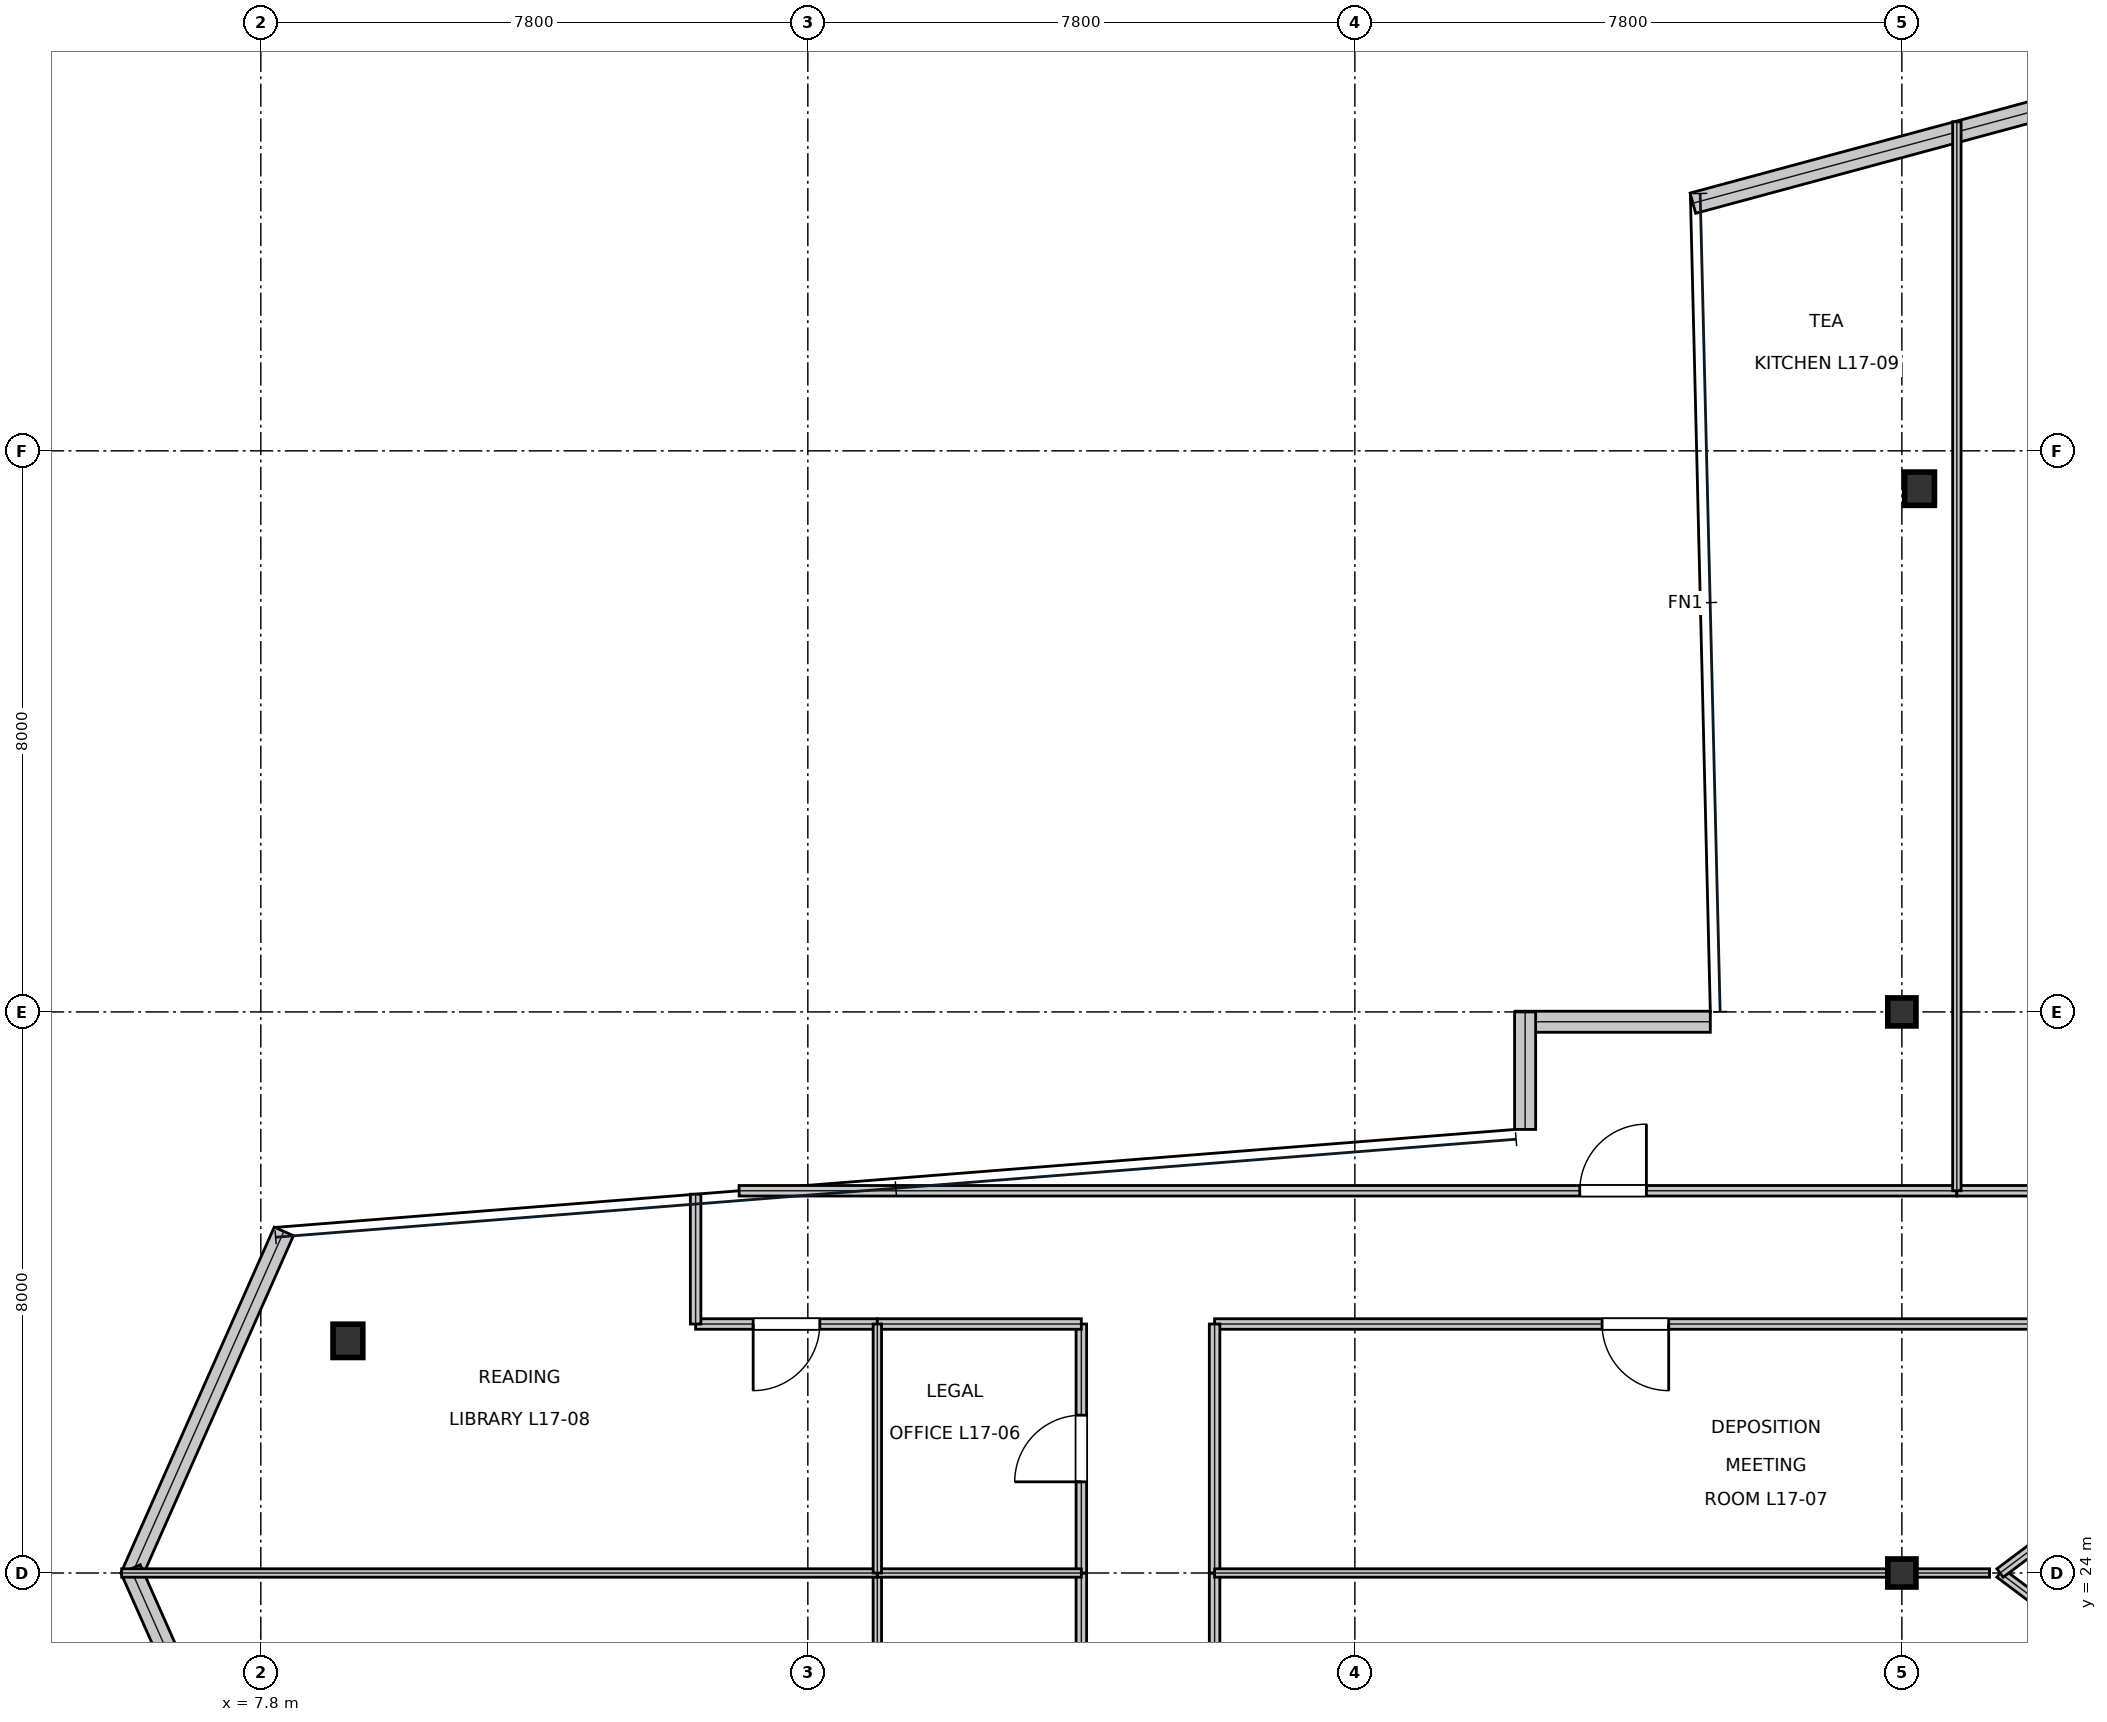
"""IFC4 building model, lengths in metres.
Left out: names, types, materials, properties, quantities, classifications, styles, units other than length and angle.
Written with IfcOpenShell. Run it as: python <this file> out.ifc"""

import sys

from ifc_helpers import new_model, si_unit, direction, frame, frame_2d, origin, origin_2d, place, context, subcontext, project, spatial, rectangle, i_section, extrude, element, fill, save


model = new_model("IFC4")
c1 = context("Model", 3, precision=1e-05, world=origin(), true_north=direction((0.0, 1.0)))
c2 = subcontext(c1, "Body", "Model", "MODEL_VIEW")
j1 = project(units=[si_unit("LENGTHUNIT", "METRE"), si_unit("PLANEANGLEUNIT", "RADIAN")], contexts=[c1])
p1 = place(None, origin())
s1 = spatial("IfcSite", under=j1, at=p1, CompositionType="ELEMENT")
p2 = place(p1, origin())
s2 = spatial("IfcBuilding", under=s1, at=p2, CompositionType="ELEMENT")
p3 = place(p2, frame((0.0, 0.0, 78.3)))
s3 = spatial("IfcBuildingStorey", under=s2, at=p3, CompositionType="ELEMENT", Elevation=78.3)
for number, where, z_axis, x_axis in (
    (1, (31.2, 24.0, 0.0), (0.0, 0.0, 1.0), (1.0, 0.0, 0.0)),
    (2, (31.2, 32.0, 0.0), (0.0, 0.0, 1.0), (1.0, 0.0, 0.0)),
):
    element("IfcColumn", number, at=place(p3, frame(where, z_axis=z_axis, x_axis=x_axis)), inside=s3, PredefinedType="COLUMN", context=c2, shape_type="SweptSolid", body=[
        extrude(i_section(OverallWidth=0.401, OverallDepth=0.399, WebThickness=0.025, FlangeThickness=0.04, at=origin_2d()), origin(), (0.0, 0.0, 1.0), 4.044),
    ])
for number, where, z_axis, x_axis in (
    (3, (9.042, 27.31, 0.016), (0.0, 0.0, 1.0), (1.0, 0.0, 0.0)),
    (4, (31.452, 39.46, 0.016), (0.0, 0.0, 1.0), (1.0, 0.0, 0.0)),
):
    element("IfcColumn", number, at=place(p3, frame(where, z_axis=z_axis, x_axis=x_axis)), inside=s3, PredefinedType="COLUMN", context=c2, shape_type="SweptSolid", body=[
        extrude(i_section(OverallWidth=0.424, OverallDepth=0.474, WebThickness=0.048, FlangeThickness=0.077, at=origin_2d()), origin(), (0.0, 0.0, 1.0), 4.018),
    ])
p4 = place(p3, frame((34.962, 45.351, 0.0), z_axis=(0.0, 0.0, 1.0), x_axis=(-0.965438319853, -0.260631637679, 0.0)))
e5 = element("IfcWall", 5, at=p4, inside=s3, PredefinedType="STANDARD", context=c2, shape_type="SweptSolid", body=[
    extrude(rectangle(XDim=6.983, YDim=0.3, at=frame_2d((3.492, 0.0))), origin(), (0.0, 0.0, 1.0), 3.81),
])
p5 = place(p3, frame((28.469, 31.86, 0.0), z_axis=(0.0, 0.0, 1.0), x_axis=(-1.0, 0.0, 0.0)))
e6 = element("IfcWall", 6, at=p5, inside=s3, PredefinedType="STANDARD", context=c2, shape_type="SweptSolid", body=[
    extrude(rectangle(XDim=2.781, YDim=0.3, at=frame_2d((1.39, 0.0))), origin(), (0.0, 0.0, 1.0), 3.81),
])
p6 = place(p3, frame((25.828, 32.0, 0.0), z_axis=(0.0, 0.0, 1.0), x_axis=(0.0, -1.0, 0.0)))
e7 = element("IfcWall", 7, at=p6, inside=s3, PredefinedType="STANDARD", context=c2, shape_type="SweptSolid", body=[
    extrude(rectangle(XDim=1.675, YDim=0.3, at=frame_2d((0.838, 0.0))), origin(), (0.0, 0.0, 1.0), 3.338),
])
for number, where, z_axis, x_axis in (
    (8, (8.128, 28.87, 0.0), (0.0, 0.0, 1.0), (-0.405, -0.914, 0.0)),
    (9, (5.944, 24.057, 0.0), (0.0, 0.0, 1.0), (0.405, -0.914, 0.0)),
):
    element("IfcWall", number, at=place(p3, frame(where, z_axis=z_axis, x_axis=x_axis)), inside=s3, PredefinedType="STANDARD", context=c2, shape_type="SweptSolid", body=[
        extrude(rectangle(XDim=5.389, YDim=0.3, at=frame_2d((2.695, 0.0))), origin(), (0.0, 0.0, 1.0), 3.81),
    ])
p7 = place(p3, frame((19.5, 20.45, 0.0), z_axis=(0.0, 0.0, 1.0), x_axis=(0.0, 1.0, 0.0)))
e10 = element("IfcWall", 10, at=p7, inside=s3, PredefinedType="PARTITIONING", context=c2, shape_type="SweptSolid", body=[
    extrude(rectangle(XDim=3.55, YDim=0.15, at=frame_2d((1.775, 0.0))), origin(), (0.0, 0.0, 1.0), 3.181),
])
p8 = place(p7, frame((1.3, 0.0, 0.0)))
e11 = element("IfcOpeningElement", 11, at=p8, cuts=e10, PredefinedType="OPENING", context=c2, shape_type="SweptSolid", body=[
    extrude(rectangle(XDim=0.95, YDim=2.15, at=frame_2d((0.475, 1.075))), frame((0.0, 0.085, 0.0), z_axis=(0.0, -1.0, 0.0), x_axis=(1.0, 0.0, 0.0)), (0.0, 0.0, 1.0), 0.17),
])
p9 = place(p3, frame((19.5, 24.0, 0.0), z_axis=(0.0, 0.0, 1.0), x_axis=(0.0, 1.0, 0.0)))
e12 = element("IfcWall", 12, at=p9, inside=s3, PredefinedType="PARTITIONING", context=c2, shape_type="SweptSolid", body=[
    extrude(rectangle(XDim=3.55, YDim=0.15, at=frame_2d((1.775, 0.0))), origin(), (0.0, 0.0, 1.0), 3.181),
])
p10 = place(p9, frame((1.3, 0.0, 0.0)))
e13 = element("IfcOpeningElement", 13, at=p10, cuts=e12, PredefinedType="OPENING", context=c2, shape_type="SweptSolid", body=[
    extrude(rectangle(XDim=0.95, YDim=2.15, at=frame_2d((0.475, 1.075))), frame((0.0, 0.085, 0.0), z_axis=(0.0, -1.0, 0.0), x_axis=(1.0, 0.0, 0.0)), (0.0, 0.0, 1.0), 0.17),
])
p11 = place(p3, frame((21.4, 27.55, 0.0), z_axis=(0.0, 0.0, 1.0), x_axis=(1.0, 0.0, 0.0)))
e14 = element("IfcWall", 14, at=p11, inside=s3, PredefinedType="PARTITIONING", context=c2, shape_type="SweptSolid", body=[
    extrude(rectangle(XDim=12.0, YDim=0.15, at=frame_2d((6.0, 0.0))), origin(), (0.0, 0.0, 1.0), 3.181),
])
p12 = place(p11, frame((5.525, 0.0, 0.0)))
e15 = element("IfcOpeningElement", 15, at=p12, cuts=e14, PredefinedType="OPENING", context=c2, shape_type="SweptSolid", body=[
    extrude(rectangle(XDim=0.95, YDim=2.15, at=frame_2d((0.475, 1.075))), frame((0.0, 0.085, 0.0), z_axis=(0.0, -1.0, 0.0), x_axis=(1.0, 0.0, 0.0)), (0.0, 0.0, 1.0), 0.17),
])
p13 = place(p3, frame((14.0, 27.55, 0.0), z_axis=(0.0, 0.0, 1.0), x_axis=(1.0, 0.0, 0.0)))
e16 = element("IfcWall", 16, at=p13, inside=s3, PredefinedType="PARTITIONING", context=c2, shape_type="SweptSolid", body=[
    extrude(rectangle(XDim=2.591, YDim=0.15, at=frame_2d((1.295, 0.0))), origin(), (0.0, 0.0, 1.0), 3.81),
])
p14 = place(p13, frame((0.821, 0.0, 0.0)))
e17 = element("IfcOpeningElement", 17, at=p14, cuts=e16, PredefinedType="OPENING", context=c2, shape_type="SweptSolid", body=[
    extrude(rectangle(XDim=0.95, YDim=2.15, at=frame_2d((0.475, 1.075))), frame((0.0, 0.085, 0.0), z_axis=(0.0, -1.0, 0.0), x_axis=(1.0, 0.0, 0.0)), (0.0, 0.0, 1.0), 0.17),
])
p15 = place(p3, frame((14.62, 29.45, 0.0), z_axis=(0.0, 0.0, 1.0), x_axis=(1.0, 0.0, 0.0)))
e18 = element("IfcWall", 18, at=p15, inside=s3, PredefinedType="PARTITIONING", context=c2, shape_type="SweptSolid", body=[
    extrude(rectangle(XDim=17.364, YDim=0.15, at=frame_2d((8.682, 0.0))), origin(), (0.0, 0.0, 1.0), 3.181),
])
p16 = place(p15, frame((11.987, 0.0, 0.0)))
e19 = element("IfcOpeningElement", 19, at=p16, cuts=e18, PredefinedType="OPENING", context=c2, shape_type="SweptSolid", body=[
    extrude(rectangle(XDim=0.95, YDim=2.15, at=frame_2d((0.475, 1.075))), frame((0.0, 0.085, 0.0), z_axis=(0.0, -1.0, 0.0), x_axis=(1.0, 0.0, 0.0)), (0.0, 0.0, 1.0), 0.17),
])
p17 = place(p3, frame((21.4, 20.45, 0.0), z_axis=(0.0, 0.0, 1.0), x_axis=(0.0, 1.0, 0.0)))
e20 = element("IfcWall", 20, at=p17, inside=s3, PredefinedType="PARTITIONING", context=c2, shape_type="SweptSolid", body=[
    extrude(rectangle(XDim=3.55, YDim=0.15, at=frame_2d((1.775, 0.0))), origin(), (0.0, 0.0, 1.0), 3.181),
])
p18 = place(p3, frame((16.591, 27.55, 0.0), z_axis=(0.0, 0.0, 1.0), x_axis=(1.0, 0.0, 0.0)))
e21 = element("IfcWall", 21, at=p18, inside=s3, PredefinedType="PARTITIONING", context=c2, shape_type="SweptSolid", body=[
    extrude(rectangle(XDim=2.909, YDim=0.15, at=frame_2d((1.455, 0.0))), origin(), (0.0, 0.0, 1.0), 3.391),
])
p19 = place(p3, frame((21.4, 24.0, 0.0), z_axis=(0.0, 0.0, 1.0), x_axis=(0.0, 1.0, 0.0)))
e22 = element("IfcWall", 22, at=p19, inside=s3, PredefinedType="PARTITIONING", context=c2, shape_type="SweptSolid", body=[
    extrude(rectangle(XDim=3.55, YDim=0.15, at=frame_2d((1.775, 0.0))), origin(), (0.0, 0.0, 1.0), 3.181),
])
p20 = place(p3, frame((14.0, 27.55, 0.0), z_axis=(0.0, 0.0, 1.0), x_axis=(0.0, 1.0, 0.0)))
e23 = element("IfcWall", 23, at=p20, inside=s3, PredefinedType="PARTITIONING", context=c2, shape_type="SweptSolid", body=[
    extrude(rectangle(XDim=1.851, YDim=0.15, at=frame_2d((0.925, 0.0))), origin(), (0.0, 0.0, 1.0), 3.338),
])
p21 = place(p3, frame((31.984, 29.45, 0.0), z_axis=(0.0, 0.0, 1.0), x_axis=(1.0, 0.0, 0.0)))
e24 = element("IfcWall", 24, at=p21, inside=s3, PredefinedType="PARTITIONING", context=c2, shape_type="SweptSolid", body=[
    extrude(rectangle(XDim=1.416, YDim=0.15, at=frame_2d((0.708, 0.0))), origin(), (0.0, 0.0, 1.0), 3.81),
])
p22 = place(p3, frame((16.591, 20.45, 0.0), z_axis=(0.0, 0.0, 1.0), x_axis=(0.0, 1.0, 0.0)))
e25 = element("IfcWall", 25, at=p22, inside=s3, PredefinedType="PARTITIONING", context=c2, shape_type="SweptSolid", body=[
    extrude(rectangle(XDim=3.55, YDim=0.12, at=frame_2d((1.775, 0.0))), origin(), (0.0, 0.0, 1.0), 3.181),
])
p23 = place(p3, frame((5.816, 24.0, 0.0), z_axis=(0.0, 0.0, 1.0), x_axis=(1.0, 0.0, 0.0)))
e26 = element("IfcWall", 26, at=p23, inside=s3, PredefinedType="PARTITIONING", context=c2, shape_type="SweptSolid", body=[
    extrude(rectangle(XDim=10.775, YDim=0.12, at=frame_2d((5.388, 0.0))), origin(), (0.0, 0.0, 1.0), 3.338),
])
p24 = place(p3, frame((21.4, 24.0, 0.0), z_axis=(0.0, 0.0, 1.0), x_axis=(1.0, 0.0, 0.0)))
e27 = element("IfcWall", 27, at=p24, inside=s3, PredefinedType="PARTITIONING", context=c2, shape_type="SweptSolid", body=[
    extrude(rectangle(XDim=11.05, YDim=0.12, at=frame_2d((5.525, 0.0))), origin(), (0.0, 0.0, 1.0), 3.181),
])
p25 = place(p3, frame((16.591, 24.0, 0.0), z_axis=(0.0, 0.0, 1.0), x_axis=(1.0, 0.0, 0.0)))
e28 = element("IfcWall", 28, at=p25, inside=s3, PredefinedType="PARTITIONING", context=c2, shape_type="SweptSolid", body=[
    extrude(rectangle(XDim=2.909, YDim=0.12, at=frame_2d((1.455, 0.0))), origin(), (0.0, 0.0, 1.0), 3.391),
])
p26 = place(p3, frame((16.591, 24.0, 0.0), z_axis=(0.0, 0.0, 1.0), x_axis=(0.0, 1.0, 0.0)))
e29 = element("IfcWall", 29, at=p26, inside=s3, PredefinedType="PARTITIONING", context=c2, shape_type="SweptSolid", body=[
    extrude(rectangle(XDim=3.55, YDim=0.12, at=frame_2d((1.775, 0.0))), origin(), (0.0, 0.0, 1.0), 3.181),
])
p27 = place(p3, frame((31.984, 29.45, 0.0), z_axis=(0.0, 0.0, 1.0), x_axis=(0.0, 1.0, 0.0)))
e30 = element("IfcWall", 30, at=p27, inside=s3, PredefinedType="PARTITIONING", context=c2, shape_type="SweptSolid", body=[
    extrude(rectangle(XDim=15.242, YDim=0.12, at=frame_2d((7.621, 0.0))), origin(), (0.0, 0.0, 1.0), 3.181),
])
for number, where, z_axis, x_axis in (
    (31, (32.6, 24.0, 0.0), (0.0, 0.0, 1.0), (0.8, -0.6, 0.0)),
    (32, (36.6, 27.0, 0.0), (0.0, 0.0, 1.0), (-0.8, -0.6, 0.0)),
):
    element("IfcWall", number, at=place(p3, frame(where, z_axis=z_axis, x_axis=x_axis)), inside=s3, PredefinedType="MOVABLE", context=c2, shape_type="SweptSolid", body=[
        extrude(rectangle(XDim=5.0, YDim=0.15, at=frame_2d((2.5, 0.0))), origin(), (0.0, 0.0, 1.0), 3.81),
    ])
p28 = place(p10, origin())
e33 = element("IfcDoor", 33, at=p28, inside=s3, OperationType="SINGLE_SWING_LEFT", PredefinedType="DOOR", context=c2, shape_type="SweptSolid", body=[
    extrude(rectangle(XDim=0.95, YDim=2.15, at=frame_2d((0.475, 1.075))), frame((0.0, 0.025, 0.0), z_axis=(0.0, -1.0, 0.0), x_axis=(1.0, 0.0, 0.0)), (0.0, 0.0, 1.0), 0.05),
])
fill(e13, e33)
p29 = place(p12, frame((0.95, 0.0, 0.0), z_axis=(0.0, 0.0, 1.0), x_axis=(-1.0, 0.0, 0.0)))
e34 = element("IfcDoor", 34, at=p29, inside=s3, OperationType="SINGLE_SWING_LEFT", PredefinedType="DOOR", context=c2, shape_type="SweptSolid", body=[
    extrude(rectangle(XDim=0.95, YDim=2.15, at=frame_2d((0.475, 1.075))), frame((0.0, 0.025, 0.0), z_axis=(0.0, -1.0, 0.0), x_axis=(1.0, 0.0, 0.0)), (0.0, 0.0, 1.0), 0.05),
])
fill(e15, e34)
p30 = place(p14, frame((0.95, 0.0, 0.0), z_axis=(0.0, 0.0, 1.0), x_axis=(-1.0, 0.0, 0.0)))
e35 = element("IfcDoor", 35, at=p30, inside=s3, OperationType="SINGLE_SWING_RIGHT", PredefinedType="DOOR", context=c2, shape_type="SweptSolid", body=[
    extrude(rectangle(XDim=0.95, YDim=2.15, at=frame_2d((0.475, 1.075))), frame((0.0, 0.025, 0.0), z_axis=(0.0, -1.0, 0.0), x_axis=(1.0, 0.0, 0.0)), (0.0, 0.0, 1.0), 0.05),
])
fill(e17, e35)
p31 = place(p16, origin())
e36 = element("IfcDoor", 36, at=p31, inside=s3, OperationType="SINGLE_SWING_RIGHT", PredefinedType="DOOR", context=c2, shape_type="SweptSolid", body=[
    extrude(rectangle(XDim=0.95, YDim=2.15, at=frame_2d((0.475, 1.075))), frame((0.0, 0.025, 0.0), z_axis=(0.0, -1.0, 0.0), x_axis=(1.0, 0.0, 0.0)), (0.0, 0.0, 1.0), 0.05),
])
fill(e19, e36)
save(model, sys.argv[1])
